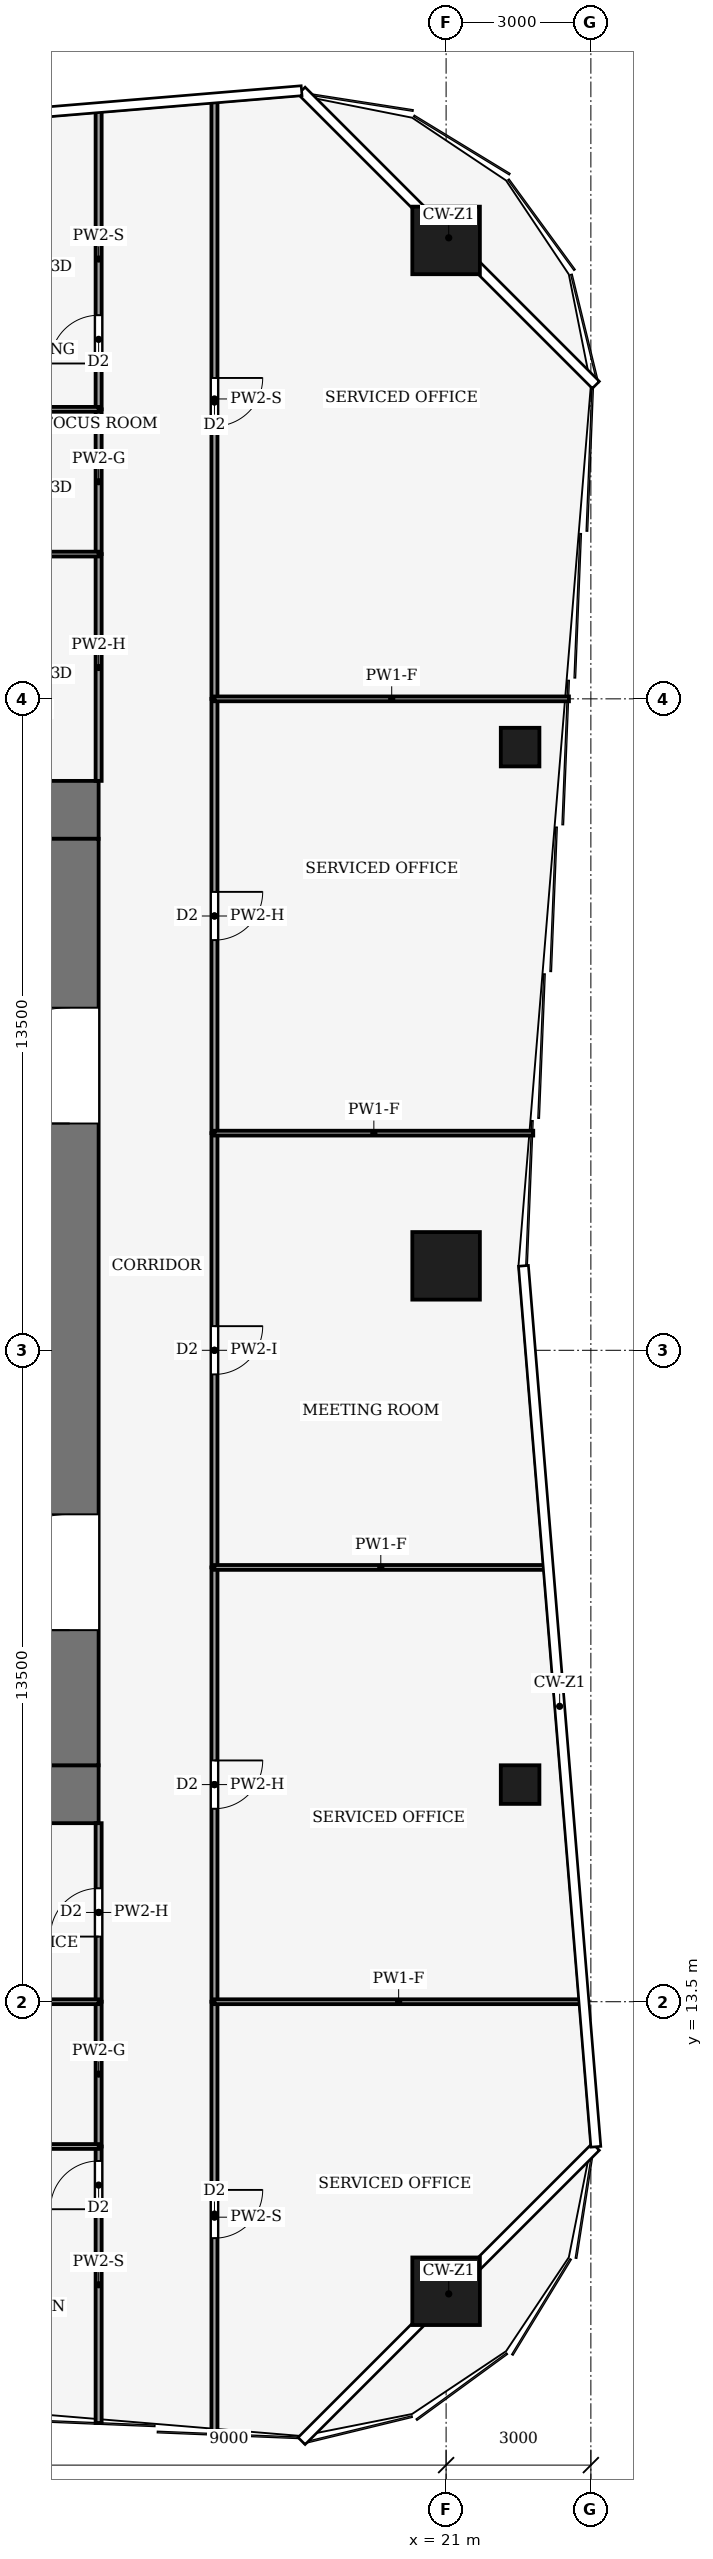
"""IFC4 building model, lengths in metres.
Left out: names, types, materials, properties, quantities, classifications, styles, units other than length and angle.
Written with IfcOpenShell. Run it as: python <this file> out.ifc"""

import sys

from ifc_helpers import new_model, si_unit, direction, frame, frame_2d, origin, origin_2d, place, context, subcontext, project, spatial, rectangle, hollow_rectangle, extrude, element, fill, save


model = new_model("IFC4")
c1 = context("Model", 3, precision=1e-05, world=origin(), true_north=direction((0.0, 1.0)))
c2 = subcontext(c1, "Body", "Model", "MODEL_VIEW")
j1 = project(units=[si_unit("LENGTHUNIT", "METRE"), si_unit("PLANEANGLEUNIT", "RADIAN")], contexts=[c1])
p1 = place(None, origin())
s1 = spatial("IfcSite", under=j1, at=p1, CompositionType="ELEMENT")
p2 = place(p1, origin())
s2 = spatial("IfcBuilding", under=s1, at=p2, CompositionType="ELEMENT")
p3 = place(p2, frame((0.0, 0.0, 102.0)))
s3 = spatial("IfcBuildingStorey", under=s2, at=p3, CompositionType="ELEMENT", Elevation=102.0)
for number, where, z_axis, x_axis in (
    (1, (-13.8, 17.8, -0.13), (0.0, 0.0, 1.0), (1.0, 0.0, 0.0)),
    (2, (-13.8, 38.2, -0.13), (0.0, 0.0, 1.0), (1.0, 0.0, 0.0)),
):
    element("IfcWall", number, at=place(p3, frame(where, z_axis=z_axis, x_axis=x_axis)), inside=s3, PredefinedType="SHEAR", context=c2, shape_type="SweptSolid", body=[
        extrude(rectangle(XDim=27.6, YDim=1.2, at=frame_2d((13.8, 0.0))), origin(), (0.0, 0.0, 1.0), 4.0),
    ])
p4 = place(p3, frame((13.2, 18.4, -0.13), z_axis=(0.0, 0.0, 1.0), x_axis=(0.0, 1.0, 0.0)))
e3 = element("IfcWall", 3, at=p4, inside=s3, PredefinedType="SHEAR", context=c2, shape_type="SweptSolid", body=[
    extrude(rectangle(XDim=19.2, YDim=1.2, at=frame_2d((9.6, 0.0))), origin(), (0.0, 0.0, 1.0), 4.0),
])
p5 = place(p4, frame((2.8, 0.0, 0.13)))
e4 = element("IfcOpeningElement", 4, at=p5, cuts=e3, PredefinedType="OPENING", context=c2, shape_type="SweptSolid", body=[
    extrude(rectangle(XDim=2.4, YDim=2.4, at=frame_2d((1.2, 1.2))), frame((0.0, 0.61, 0.0), z_axis=(0.0, -1.0, 0.0), x_axis=(1.0, 0.0, 0.0)), (0.0, 0.0, 1.0), 1.22),
])
p6 = place(p4, frame((13.3, 0.0, 0.13)))
e5 = element("IfcOpeningElement", 5, at=p6, cuts=e3, PredefinedType="OPENING", context=c2, shape_type="SweptSolid", body=[
    extrude(rectangle(XDim=2.4, YDim=2.4, at=frame_2d((1.2, 1.2))), frame((0.0, 0.61, 0.0), z_axis=(0.0, -1.0, 0.0), x_axis=(1.0, 0.0, 0.0)), (0.0, 0.0, 1.0), 1.22),
])
for number, where, z_axis, x_axis in (
    (6, (21.0, 50.0, 0.0), (0.0, 0.0, 1.0), (1.0, 0.0, 0.0)),
    (7, (21.0, 28.75, 0.0), (0.0, 0.0, 1.0), (1.0, 0.0, 0.0)),
    (8, (21.0, 7.5, 0.0), (0.0, 0.0, 1.0), (1.0, 0.0, 0.0)),
):
    element("IfcColumn", number, at=place(p3, frame(where, z_axis=z_axis, x_axis=x_axis)), inside=s3, PredefinedType="COLUMN", context=c2, shape_type="SweptSolid", body=[
        extrude(hollow_rectangle(XDim=1.4, YDim=1.4, WallThickness=0.08, at=origin_2d()), origin(), (0.0, 0.0, 1.0), 4.0),
    ])
for number, where, z_axis, x_axis in (
    (9, (22.534, 18.0, 0.0), (0.0, 0.0, 1.0), (1.0, 0.0, 0.0)),
    (10, (22.534, 39.5, 0.0), (0.0, 0.0, 1.0), (1.0, 0.0, 0.0)),
):
    element("IfcColumn", number, at=place(p3, frame(where, z_axis=z_axis, x_axis=x_axis)), inside=s3, PredefinedType="COLUMN", context=c2, shape_type="SweptSolid", body=[
        extrude(hollow_rectangle(XDim=0.8, YDim=0.8, WallThickness=0.04, at=origin_2d()), origin(), (0.0, 0.0, 1.0), 4.0),
    ])
p7 = place(p3, frame((16.2, 13.5, 0.0), z_axis=(0.0, 0.0, 1.0), x_axis=(0.0, -1.0, 0.0)))
e11 = element("IfcWall", 11, at=p7, inside=s3, PredefinedType="PARTITIONING", context=c2, shape_type="SweptSolid", body=[
    extrude(rectangle(XDim=8.93, YDim=0.125, at=frame_2d((4.465, 0.0))), origin(), (0.0, 0.0, 1.0), 3.04),
])
p8 = place(p7, frame((3.9, 0.0, 0.0)))
e12 = element("IfcOpeningElement", 12, at=p8, cuts=e11, PredefinedType="OPENING", context=c2, shape_type="SweptSolid", body=[
    extrude(rectangle(XDim=1.0, YDim=2.1, at=frame_2d((0.5, 1.05))), frame((0.0, 0.073, 0.0), z_axis=(0.0, -1.0, 0.0), x_axis=(1.0, 0.0, 0.0)), (0.0, 0.0, 1.0), 0.145),
])
p9 = place(p3, frame((16.2, 22.5, 0.0), z_axis=(0.0, 0.0, 1.0), x_axis=(0.0, -1.0, 0.0)))
e13 = element("IfcWall", 13, at=p9, inside=s3, PredefinedType="PARTITIONING", context=c2, shape_type="SweptSolid", body=[
    extrude(rectangle(XDim=9.0, YDim=0.125, at=frame_2d((4.5, 0.0))), origin(), (0.0, 0.0, 1.0), 3.14),
])
p10 = place(p9, frame((4.0, 0.0, 0.0)))
e14 = element("IfcOpeningElement", 14, at=p10, cuts=e13, PredefinedType="OPENING", context=c2, shape_type="SweptSolid", body=[
    extrude(rectangle(XDim=1.0, YDim=2.1, at=frame_2d((0.5, 1.05))), frame((0.0, 0.073, 0.0), z_axis=(0.0, -1.0, 0.0), x_axis=(1.0, 0.0, 0.0)), (0.0, 0.0, 1.0), 0.145),
])
p11 = place(p3, frame((16.2, 31.5, 0.0), z_axis=(0.0, 0.0, 1.0), x_axis=(0.0, -1.0, 0.0)))
e15 = element("IfcWall", 15, at=p11, inside=s3, PredefinedType="PARTITIONING", context=c2, shape_type="SweptSolid", body=[
    extrude(rectangle(XDim=9.0, YDim=0.125, at=frame_2d((4.5, 0.0))), origin(), (0.0, 0.0, 1.0), 3.48),
])
p12 = place(p11, frame((4.0, 0.0, 0.0)))
e16 = element("IfcOpeningElement", 16, at=p12, cuts=e15, PredefinedType="OPENING", context=c2, shape_type="SweptSolid", body=[
    extrude(rectangle(XDim=1.0, YDim=2.1, at=frame_2d((0.5, 1.05))), frame((0.0, 0.073, 0.0), z_axis=(0.0, -1.0, 0.0), x_axis=(1.0, 0.0, 0.0)), (0.0, 0.0, 1.0), 0.145),
])
p13 = place(p3, frame((16.2, 40.5, 0.0), z_axis=(0.0, 0.0, 1.0), x_axis=(0.0, -1.0, 0.0)))
e17 = element("IfcWall", 17, at=p13, inside=s3, PredefinedType="PARTITIONING", context=c2, shape_type="SweptSolid", body=[
    extrude(rectangle(XDim=9.0, YDim=0.125, at=frame_2d((4.5, 0.0))), origin(), (0.0, 0.0, 1.0), 3.14),
])
p14 = place(p13, frame((4.0, 0.0, 0.0)))
e18 = element("IfcOpeningElement", 18, at=p14, cuts=e17, PredefinedType="OPENING", context=c2, shape_type="SweptSolid", body=[
    extrude(rectangle(XDim=1.0, YDim=2.1, at=frame_2d((0.5, 1.05))), frame((0.0, 0.073, 0.0), z_axis=(0.0, -1.0, 0.0), x_axis=(1.0, 0.0, 0.0)), (0.0, 0.0, 1.0), 0.145),
])
p15 = place(p3, frame((16.2, 52.93, 0.0), z_axis=(0.0, 0.0, 1.0), x_axis=(0.0, -1.0, 0.0)))
e19 = element("IfcWall", 19, at=p15, inside=s3, PredefinedType="PARTITIONING", context=c2, shape_type="SweptSolid", body=[
    extrude(rectangle(XDim=12.43, YDim=0.125, at=frame_2d((6.215, 0.0))), origin(), (0.0, 0.0, 1.0), 3.04),
])
p16 = place(p15, frame((5.78, 0.0, 0.0)))
e20 = element("IfcOpeningElement", 20, at=p16, cuts=e19, PredefinedType="OPENING", context=c2, shape_type="SweptSolid", body=[
    extrude(rectangle(XDim=1.0, YDim=2.1, at=frame_2d((0.5, 1.05))), frame((0.0, 0.073, 0.0), z_axis=(0.0, -1.0, 0.0), x_axis=(1.0, 0.0, 0.0)), (0.0, 0.0, 1.0), 0.145),
])
p17 = place(p3, frame((13.8, 4.77, 0.0), z_axis=(0.0, 0.0, 1.0), x_axis=(0.0, 1.0, 0.0)))
e21 = element("IfcWall", 21, at=p17, inside=s3, PredefinedType="PARTITIONING", context=c2, shape_type="SweptSolid", body=[
    extrude(rectangle(XDim=5.73, YDim=0.125, at=frame_2d((2.865, 0.0))), origin(), (0.0, 0.0, 1.0), 3.04),
])
p18 = place(p17, frame((4.43, 0.0, 0.0)))
e22 = element("IfcOpeningElement", 22, at=p18, cuts=e21, PredefinedType="OPENING", context=c2, shape_type="SweptSolid", body=[
    extrude(rectangle(XDim=1.0, YDim=2.1, at=frame_2d((0.5, 1.05))), frame((0.0, 0.073, 0.0), z_axis=(0.0, -1.0, 0.0), x_axis=(1.0, 0.0, 0.0)), (0.0, 0.0, 1.0), 0.145),
])
p19 = place(p3, frame((13.8, 13.5, 0.0), z_axis=(0.0, 0.0, 1.0), x_axis=(0.0, -1.0, 0.0)))
e23 = element("IfcWall", 23, at=p19, inside=s3, PredefinedType="PARTITIONING", context=c2, shape_type="SweptSolid", body=[
    extrude(rectangle(XDim=3.0, YDim=0.125, at=frame_2d((1.5, 0.0))), origin(), (0.0, 0.0, 1.0), 3.87),
])
p20 = place(p3, frame((13.8, 13.5, 0.0), z_axis=(0.0, 0.0, 1.0), x_axis=(0.0, 1.0, 0.0)))
e24 = element("IfcWall", 24, at=p20, inside=s3, PredefinedType="PARTITIONING", context=c2, shape_type="SweptSolid", body=[
    extrude(rectangle(XDim=3.7, YDim=0.125, at=frame_2d((1.85, 0.0))), origin(), (0.0, 0.0, 1.0), 3.14),
])
p21 = place(p20, frame((1.35, 0.0, 0.0)))
e25 = element("IfcOpeningElement", 25, at=p21, cuts=e24, PredefinedType="OPENING", context=c2, shape_type="SweptSolid", body=[
    extrude(rectangle(XDim=1.0, YDim=2.1, at=frame_2d((0.5, 1.05))), frame((0.0, 0.073, 0.0), z_axis=(0.0, -1.0, 0.0), x_axis=(1.0, 0.0, 0.0)), (0.0, 0.0, 1.0), 0.145),
])
p22 = place(p3, frame((13.8, 43.5, 0.0), z_axis=(0.0, 0.0, 1.0), x_axis=(0.0, -1.0, 0.0)))
e26 = element("IfcWall", 26, at=p22, inside=s3, PredefinedType="PARTITIONING", context=c2, shape_type="SweptSolid", body=[
    extrude(rectangle(XDim=4.7, YDim=0.125, at=frame_2d((2.35, 0.0))), origin(), (0.0, 0.0, 1.0), 3.14),
])
p23 = place(p3, frame((13.8, 46.5, 0.0), z_axis=(0.0, 0.0, 1.0), x_axis=(0.0, -1.0, 0.0)))
e27 = element("IfcWall", 27, at=p23, inside=s3, PredefinedType="PARTITIONING", context=c2, shape_type="SweptSolid", body=[
    extrude(rectangle(XDim=3.0, YDim=0.125, at=frame_2d((1.5, 0.0))), origin(), (0.0, 0.0, 1.0), 3.87),
])
p24 = place(p3, frame((13.8, 46.5, 0.0), z_axis=(0.0, 0.0, 1.0), x_axis=(0.0, 1.0, 0.0)))
e28 = element("IfcWall", 28, at=p24, inside=s3, PredefinedType="PARTITIONING", context=c2, shape_type="SweptSolid", body=[
    extrude(rectangle(XDim=6.23, YDim=0.125, at=frame_2d((3.115, 0.0))), origin(), (0.0, 0.0, 1.0), 3.04),
])
p25 = place(p24, frame((0.95, 0.0, 0.0)))
e29 = element("IfcOpeningElement", 29, at=p25, cuts=e28, PredefinedType="OPENING", context=c2, shape_type="SweptSolid", body=[
    extrude(rectangle(XDim=1.0, YDim=2.1, at=frame_2d((0.5, 1.05))), frame((0.0, 0.073, 0.0), z_axis=(0.0, -1.0, 0.0), x_axis=(1.0, 0.0, 0.0)), (0.0, 0.0, 1.0), 0.145),
])
p26 = place(p3, frame((23.833, 13.5, 0.0), z_axis=(0.0, 0.0, 1.0), x_axis=(-1.0, 0.0, 0.0)))
e30 = element("IfcWall", 30, at=p26, inside=s3, PredefinedType="PARTITIONING", context=c2, shape_type="SweptSolid", body=[
    extrude(rectangle(XDim=7.634, YDim=0.1, at=frame_2d((3.817, 0.0))), origin(), (0.0, 0.0, 1.0), 3.04),
])
p27 = place(p3, frame((23.094, 22.5, 0.0), z_axis=(0.0, 0.0, 1.0), x_axis=(-1.0, 0.0, 0.0)))
e31 = element("IfcWall", 31, at=p27, inside=s3, PredefinedType="PARTITIONING", context=c2, shape_type="SweptSolid", body=[
    extrude(rectangle(XDim=6.894, YDim=0.1, at=frame_2d((3.447, 0.0))), origin(), (0.0, 0.0, 1.0), 3.04),
])
p28 = place(p3, frame((22.806, 31.5, 0.0), z_axis=(0.0, 0.0, 1.0), x_axis=(-1.0, 0.0, 0.0)))
e32 = element("IfcWall", 32, at=p28, inside=s3, PredefinedType="PARTITIONING", context=c2, shape_type="SweptSolid", body=[
    extrude(rectangle(XDim=6.606, YDim=0.1, at=frame_2d((3.303, 0.0))), origin(), (0.0, 0.0, 1.0), 3.04),
])
p29 = place(p3, frame((23.546, 40.5, 0.0), z_axis=(0.0, 0.0, 1.0), x_axis=(-1.0, 0.0, 0.0)))
e33 = element("IfcWall", 33, at=p29, inside=s3, PredefinedType="PARTITIONING", context=c2, shape_type="SweptSolid", body=[
    extrude(rectangle(XDim=7.346, YDim=0.1, at=frame_2d((3.673, 0.0))), origin(), (0.0, 0.0, 1.0), 3.04),
])
p30 = place(p3, frame((7.5, 10.5, 0.0), z_axis=(0.0, 0.0, 1.0), x_axis=(1.0, 0.0, 0.0)))
e34 = element("IfcWall", 34, at=p30, inside=s3, PredefinedType="PARTITIONING", context=c2, shape_type="SweptSolid", body=[
    extrude(rectangle(XDim=6.3, YDim=0.1, at=frame_2d((3.15, 0.0))), origin(), (0.0, 0.0, 1.0), 3.39),
])
p31 = place(p30, frame((2.65, 0.0, 0.0)))
e35 = element("IfcOpeningElement", 35, at=p31, cuts=e34, PredefinedType="OPENING", context=c2, shape_type="SweptSolid", body=[
    extrude(rectangle(XDim=1.0, YDim=2.1, at=frame_2d((0.5, 1.05))), frame((0.0, 0.06, 0.0), z_axis=(0.0, -1.0, 0.0), x_axis=(1.0, 0.0, 0.0)), (0.0, 0.0, 1.0), 0.12),
])
p32 = place(p3, frame((13.8, 13.5, 0.0), z_axis=(0.0, 0.0, 1.0), x_axis=(-1.0, 0.0, 0.0)))
e36 = element("IfcWall", 36, at=p32, inside=s3, PredefinedType="PARTITIONING", context=c2, shape_type="SweptSolid", body=[
    extrude(rectangle(XDim=6.3, YDim=0.1, at=frame_2d((3.15, 0.0))), origin(), (0.0, 0.0, 1.0), 3.39),
])
p33 = place(p3, frame((13.8, 43.5, 0.0), z_axis=(0.0, 0.0, 1.0), x_axis=(-1.0, 0.0, 0.0)))
e37 = element("IfcWall", 37, at=p33, inside=s3, PredefinedType="PARTITIONING", context=c2, shape_type="SweptSolid", body=[
    extrude(rectangle(XDim=3.3, YDim=0.1, at=frame_2d((1.65, 0.0))), origin(), (0.0, 0.0, 1.0), 3.39),
])
p34 = place(p33, frame((1.15, 0.0, 0.0)))
e38 = element("IfcOpeningElement", 38, at=p34, cuts=e37, PredefinedType="OPENING", context=c2, shape_type="SweptSolid", body=[
    extrude(rectangle(XDim=1.0, YDim=2.1, at=frame_2d((0.5, 1.05))), frame((0.0, 0.06, 0.0), z_axis=(0.0, -1.0, 0.0), x_axis=(1.0, 0.0, 0.0)), (0.0, 0.0, 1.0), 0.12),
])
p35 = place(p3, frame((13.8, 46.5, 0.0), z_axis=(0.0, 0.0, 1.0), x_axis=(-1.0, 0.0, 0.0)))
e39 = element("IfcWall", 39, at=p35, inside=s3, PredefinedType="PARTITIONING", context=c2, shape_type="SweptSolid", body=[
    extrude(rectangle(XDim=3.3, YDim=0.1, at=frame_2d((1.65, 0.0))), origin(), (0.0, 0.0, 1.0), 3.39),
])
p36 = place(p35, frame((1.95, 0.0, 0.0)))
e40 = element("IfcOpeningElement", 40, at=p36, cuts=e39, PredefinedType="OPENING", context=c2, shape_type="SweptSolid", body=[
    extrude(rectangle(XDim=1.0, YDim=2.1, at=frame_2d((0.5, 1.05))), frame((0.0, 0.06, 0.0), z_axis=(0.0, -1.0, 0.0), x_axis=(1.0, 0.0, 0.0)), (0.0, 0.0, 1.0), 0.12),
])
p37 = place(p5, origin())
e41 = element("IfcDoor", 41, at=p37, inside=s3, OperationType="DOUBLE_DOOR_SINGLE_SWING", PredefinedType="DOOR", context=c2, shape_type="SweptSolid", body=[
    extrude(rectangle(XDim=2.4, YDim=2.4, at=frame_2d((1.2, 1.2))), frame((0.0, 0.025, 0.0), z_axis=(0.0, -1.0, 0.0), x_axis=(1.0, 0.0, 0.0)), (0.0, 0.0, 1.0), 0.05),
])
fill(e4, e41)
p38 = place(p6, origin())
e42 = element("IfcDoor", 42, at=p38, inside=s3, OperationType="DOUBLE_DOOR_SINGLE_SWING", PredefinedType="DOOR", context=c2, shape_type="SweptSolid", body=[
    extrude(rectangle(XDim=2.4, YDim=2.4, at=frame_2d((1.2, 1.2))), frame((0.0, 0.025, 0.0), z_axis=(0.0, -1.0, 0.0), x_axis=(1.0, 0.0, 0.0)), (0.0, 0.0, 1.0), 0.05),
])
fill(e5, e42)
p39 = place(p8, origin())
e43 = element("IfcDoor", 43, at=p39, inside=s3, OperationType="SINGLE_SWING_LEFT", PredefinedType="DOOR", context=c2, shape_type="SweptSolid", body=[
    extrude(rectangle(XDim=1.0, YDim=2.1, at=frame_2d((0.5, 1.05))), frame((0.0, 0.025, 0.0), z_axis=(0.0, -1.0, 0.0), x_axis=(1.0, 0.0, 0.0)), (0.0, 0.0, 1.0), 0.05),
])
fill(e12, e43)
p40 = place(p10, origin())
e44 = element("IfcDoor", 44, at=p40, inside=s3, OperationType="SINGLE_SWING_RIGHT", PredefinedType="DOOR", context=c2, shape_type="SweptSolid", body=[
    extrude(rectangle(XDim=1.0, YDim=2.1, at=frame_2d((0.5, 1.05))), frame((0.0, 0.025, 0.0), z_axis=(0.0, -1.0, 0.0), x_axis=(1.0, 0.0, 0.0)), (0.0, 0.0, 1.0), 0.05),
])
fill(e14, e44)
p41 = place(p12, origin())
e45 = element("IfcDoor", 45, at=p41, inside=s3, OperationType="SINGLE_SWING_LEFT", PredefinedType="DOOR", context=c2, shape_type="SweptSolid", body=[
    extrude(rectangle(XDim=1.0, YDim=2.1, at=frame_2d((0.5, 1.05))), frame((0.0, 0.025, 0.0), z_axis=(0.0, -1.0, 0.0), x_axis=(1.0, 0.0, 0.0)), (0.0, 0.0, 1.0), 0.05),
])
fill(e16, e45)
p42 = place(p14, origin())
e46 = element("IfcDoor", 46, at=p42, inside=s3, OperationType="SINGLE_SWING_RIGHT", PredefinedType="DOOR", context=c2, shape_type="SweptSolid", body=[
    extrude(rectangle(XDim=1.0, YDim=2.1, at=frame_2d((0.5, 1.05))), frame((0.0, 0.025, 0.0), z_axis=(0.0, -1.0, 0.0), x_axis=(1.0, 0.0, 0.0)), (0.0, 0.0, 1.0), 0.05),
])
fill(e18, e46)
p43 = place(p16, origin())
e47 = element("IfcDoor", 47, at=p43, inside=s3, OperationType="SINGLE_SWING_RIGHT", PredefinedType="DOOR", context=c2, shape_type="SweptSolid", body=[
    extrude(rectangle(XDim=1.0, YDim=2.1, at=frame_2d((0.5, 1.05))), frame((0.0, 0.025, 0.0), z_axis=(0.0, -1.0, 0.0), x_axis=(1.0, 0.0, 0.0)), (0.0, 0.0, 1.0), 0.05),
])
fill(e20, e47)
p44 = place(p18, origin())
e48 = element("IfcDoor", 48, at=p44, inside=s3, OperationType="SINGLE_SWING_RIGHT", PredefinedType="DOOR", context=c2, shape_type="SweptSolid", body=[
    extrude(rectangle(XDim=1.0, YDim=2.1, at=frame_2d((0.5, 1.05))), frame((0.0, 0.025, 0.0), z_axis=(0.0, -1.0, 0.0), x_axis=(1.0, 0.0, 0.0)), (0.0, 0.0, 1.0), 0.05),
])
fill(e22, e48)
p45 = place(p21, origin())
e49 = element("IfcDoor", 49, at=p45, inside=s3, OperationType="SINGLE_SWING_LEFT", PredefinedType="DOOR", context=c2, shape_type="SweptSolid", body=[
    extrude(rectangle(XDim=1.0, YDim=2.1, at=frame_2d((0.5, 1.05))), frame((0.0, 0.025, 0.0), z_axis=(0.0, -1.0, 0.0), x_axis=(1.0, 0.0, 0.0)), (0.0, 0.0, 1.0), 0.05),
])
fill(e25, e49)
p46 = place(p25, origin())
e50 = element("IfcDoor", 50, at=p46, inside=s3, OperationType="SINGLE_SWING_LEFT", PredefinedType="DOOR", context=c2, shape_type="SweptSolid", body=[
    extrude(rectangle(XDim=1.0, YDim=2.1, at=frame_2d((0.5, 1.05))), frame((0.0, 0.025, 0.0), z_axis=(0.0, -1.0, 0.0), x_axis=(1.0, 0.0, 0.0)), (0.0, 0.0, 1.0), 0.05),
])
fill(e29, e50)
save(model, sys.argv[1])
